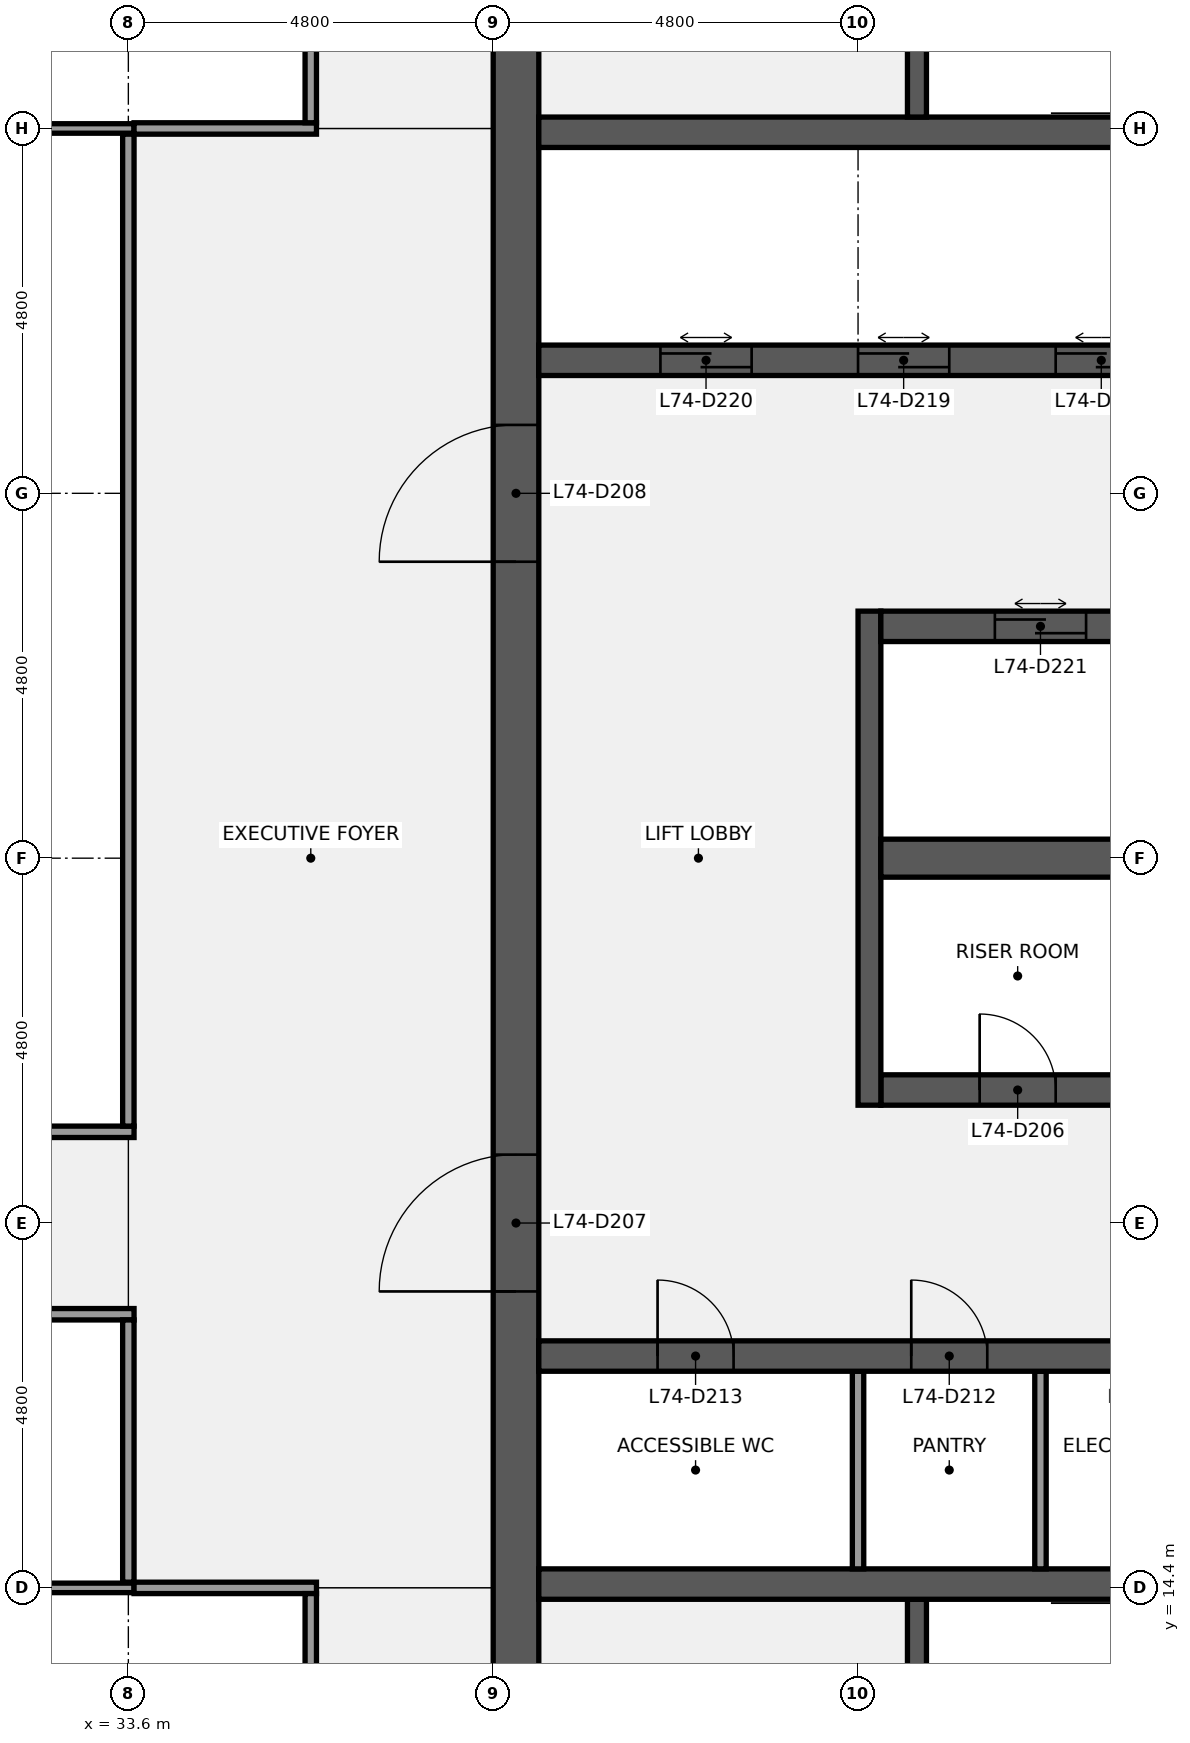
"""IFC4 building model, lengths in metres.
Left out: names, types, materials, properties, quantities, classifications, styles, units other than length and angle.
Written with IfcOpenShell. Run it as: python <this file> out.ifc"""

import sys

from ifc_helpers import new_model, si_unit, direction, frame, frame_2d, origin, place, context, subcontext, project, spatial, rectangle, extrude, element, fill, save


model = new_model("IFC4")
c1 = context("Model", 3, precision=1e-05, world=origin(), true_north=direction((0.0, 1.0)))
c2 = subcontext(c1, "Body", "Model", "MODEL_VIEW")
j1 = project(units=[si_unit("LENGTHUNIT", "METRE"), si_unit("PLANEANGLEUNIT", "RADIAN")], contexts=[c1])
p1 = place(None, origin())
s1 = spatial("IfcSite", under=j1, at=p1, CompositionType="ELEMENT")
p2 = place(p1, origin())
s2 = spatial("IfcBuilding", under=s1, at=p2, CompositionType="ELEMENT")
p3 = place(p2, frame((0.0, 0.0, 334.3)))
s3 = spatial("IfcBuildingStorey", under=s2, at=p3, CompositionType="ELEMENT", Elevation=334.3)
p4 = place(p3, frame((38.7, 9.6, 0.0), z_axis=(0.0, 0.0, 1.0), x_axis=(0.0, 1.0, 0.0)))
e1 = element("IfcWall", 1, at=p4, inside=s3, PredefinedType="SHEAR", context=c2, shape_type="SweptSolid", body=[
    extrude(rectangle(XDim=28.8, YDim=0.6, at=frame_2d((14.4, 0.0))), origin(), (0.0, 0.0, 1.0), 3.84),
])
p5 = place(p4, frame((8.7, 0.0, 0.0)))
e2 = element("IfcOpeningElement", 2, at=p5, cuts=e1, PredefinedType="OPENING", context=c2, shape_type="SweptSolid", body=[
    extrude(rectangle(XDim=1.8, YDim=2.1, at=frame_2d((0.9, 1.05))), frame((0.0, 0.31, 0.0), z_axis=(0.0, -1.0, 0.0), x_axis=(1.0, 0.0, 0.0)), (0.0, 0.0, 1.0), 0.62),
])
p6 = place(p4, frame((18.3, 0.0, 0.0)))
e3 = element("IfcOpeningElement", 3, at=p6, cuts=e1, PredefinedType="OPENING", context=c2, shape_type="SweptSolid", body=[
    extrude(rectangle(XDim=1.8, YDim=2.1, at=frame_2d((0.9, 1.05))), frame((0.0, 0.31, 0.0), z_axis=(0.0, -1.0, 0.0), x_axis=(1.0, 0.0, 0.0)), (0.0, 0.0, 1.0), 0.62),
])
p7 = place(p3, frame((43.975, 10.8, 0.0), z_axis=(0.0, 0.0, 1.0), x_axis=(0.0, 1.0, 0.0)))
e4 = element("IfcWall", 4, at=p7, inside=s3, PredefinedType="SHEAR", context=c2, shape_type="SweptSolid", body=[
    extrude(rectangle(XDim=3.45, YDim=0.25, at=frame_2d((1.725, 0.0))), origin(), (0.0, 0.0, 1.0), 3.84),
])
p8 = place(p7, frame((1.175, 0.0, 0.0)))
e5 = element("IfcOpeningElement", 5, at=p8, cuts=e4, PredefinedType="OPENING", context=c2, shape_type="SweptSolid", body=[
    extrude(rectangle(XDim=1.1, YDim=2.1, at=frame_2d((0.55, 1.05))), frame((0.0, 0.135, 0.0), z_axis=(0.0, -1.0, 0.0), x_axis=(1.0, 0.0, 0.0)), (0.0, 0.0, 1.0), 0.27),
])
p9 = place(p3, frame((39.0, 14.45, 0.0), z_axis=(0.0, 0.0, 1.0), x_axis=(1.0, 0.0, 0.0)))
e6 = element("IfcWall", 6, at=p9, inside=s3, PredefinedType="SHEAR", context=c2, shape_type="SweptSolid", body=[
    extrude(rectangle(XDim=18.0, YDim=0.4, at=frame_2d((9.0, 0.0))), origin(), (0.0, 0.0, 1.0), 3.84),
])
for number, where, z_axis, x_axis in (
    (7, (45.6, 14.65, 0.0), (0.0, 0.0, 1.0), (0.0, 1.0, 0.0)),
    (8, (43.2, 14.65, 0.0), (0.0, 0.0, 1.0), (0.0, 1.0, 0.0)),
):
    element("IfcWall", number, at=place(p3, frame(where, z_axis=z_axis, x_axis=x_axis)), inside=s3, PredefinedType="PARTITIONING", context=c2, shape_type="SweptSolid", body=[
        extrude(rectangle(XDim=2.6, YDim=0.15, at=frame_2d((1.3, 0.0))), origin(), (0.0, 0.0, 1.0), 3.84),
    ])
p10 = place(p3, frame((39.0, 17.45, 0.0), z_axis=(0.0, 0.0, 1.0), x_axis=(1.0, 0.0, 0.0)))
e9 = element("IfcWall", 9, at=p10, inside=s3, PredefinedType="SHEAR", context=c2, shape_type="SweptSolid", body=[
    extrude(rectangle(XDim=18.0, YDim=0.4, at=frame_2d((9.0, 0.0))), origin(), (0.0, 0.0, 1.0), 3.84),
])
p11 = place(p10, frame((15.137, 0.0, 0.0)))
e10 = element("IfcOpeningElement", 10, at=p11, cuts=e9, PredefinedType="OPENING", context=c2, shape_type="SweptSolid", body=[
    extrude(rectangle(XDim=1.0, YDim=2.1, at=frame_2d((0.5, 1.05))), frame((0.0, 0.21, 0.0), z_axis=(0.0, -1.0, 0.0), x_axis=(1.0, 0.0, 0.0)), (0.0, 0.0, 1.0), 0.42),
])
p12 = place(p10, frame((10.9, 0.0, 0.0)))
e11 = element("IfcOpeningElement", 11, at=p12, cuts=e9, PredefinedType="OPENING", context=c2, shape_type="SweptSolid", body=[
    extrude(rectangle(XDim=1.0, YDim=2.1, at=frame_2d((0.5, 1.05))), frame((0.0, 0.21, 0.0), z_axis=(0.0, -1.0, 0.0), x_axis=(1.0, 0.0, 0.0)), (0.0, 0.0, 1.0), 0.42),
])
p13 = place(p10, frame((7.6, 0.0, 0.0)))
e12 = element("IfcOpeningElement", 12, at=p13, cuts=e9, PredefinedType="OPENING", context=c2, shape_type="SweptSolid", body=[
    extrude(rectangle(XDim=1.0, YDim=2.1, at=frame_2d((0.5, 1.05))), frame((0.0, 0.21, 0.0), z_axis=(0.0, -1.0, 0.0), x_axis=(1.0, 0.0, 0.0)), (0.0, 0.0, 1.0), 0.42),
])
p14 = place(p10, frame((4.9, 0.0, 0.0)))
e13 = element("IfcOpeningElement", 13, at=p14, cuts=e9, PredefinedType="OPENING", context=c2, shape_type="SweptSolid", body=[
    extrude(rectangle(XDim=1.0, YDim=2.1, at=frame_2d((0.5, 1.05))), frame((0.0, 0.21, 0.0), z_axis=(0.0, -1.0, 0.0), x_axis=(1.0, 0.0, 0.0)), (0.0, 0.0, 1.0), 0.42),
])
p15 = place(p10, frame((1.562, 0.0, 0.0)))
e14 = element("IfcOpeningElement", 14, at=p15, cuts=e9, PredefinedType="OPENING", context=c2, shape_type="SweptSolid", body=[
    extrude(rectangle(XDim=1.0, YDim=2.1, at=frame_2d((0.5, 1.05))), frame((0.0, 0.21, 0.0), z_axis=(0.0, -1.0, 0.0), x_axis=(1.0, 0.0, 0.0)), (0.0, 0.0, 1.0), 0.42),
])
p16 = place(p3, frame((43.5, 20.95, 0.0), z_axis=(0.0, 0.0, 1.0), x_axis=(1.0, 0.0, 0.0)))
e15 = element("IfcWall", 15, at=p16, inside=s3, PredefinedType="SHEAR", context=c2, shape_type="SweptSolid", body=[
    extrude(rectangle(XDim=13.5, YDim=0.4, at=frame_2d((6.75, 0.0))), origin(), (0.0, 0.0, 1.0), 3.84),
])
p17 = place(p16, frame((6.15, 0.0, 0.0)))
e16 = element("IfcOpeningElement", 16, at=p17, cuts=e15, PredefinedType="OPENING", context=c2, shape_type="SweptSolid", body=[
    extrude(rectangle(XDim=1.1, YDim=2.1, at=frame_2d((0.55, 1.05))), frame((0.0, 0.21, 0.0), z_axis=(0.0, -1.0, 0.0), x_axis=(1.0, 0.0, 0.0)), (0.0, 0.0, 1.0), 0.42),
])
p18 = place(p16, frame((1.3, 0.0, 0.0)))
e17 = element("IfcOpeningElement", 17, at=p18, cuts=e15, PredefinedType="OPENING", context=c2, shape_type="SweptSolid", body=[
    extrude(rectangle(XDim=1.0, YDim=2.1, at=frame_2d((0.5, 1.05))), frame((0.0, 0.21, 0.0), z_axis=(0.0, -1.0, 0.0), x_axis=(1.0, 0.0, 0.0)), (0.0, 0.0, 1.0), 0.42),
])
p19 = place(p3, frame((43.35, 20.75, 0.0), z_axis=(0.0, 0.0, 1.0), x_axis=(0.0, 1.0, 0.0)))
e18 = element("IfcWall", 18, at=p19, inside=s3, PredefinedType="SHEAR", context=c2, shape_type="SweptSolid", body=[
    extrude(rectangle(XDim=6.5, YDim=0.3, at=frame_2d((3.25, 0.0))), origin(), (0.0, 0.0, 1.0), 3.84),
])
p20 = place(p3, frame((43.5, 24.0, 0.0), z_axis=(0.0, 0.0, 1.0), x_axis=(1.0, 0.0, 0.0)))
e19 = element("IfcWall", 19, at=p20, inside=s3, PredefinedType="SHEAR", context=c2, shape_type="SweptSolid", body=[
    extrude(rectangle(XDim=13.5, YDim=0.5, at=frame_2d((6.75, 0.0))), origin(), (0.0, 0.0, 1.0), 3.84),
])
p21 = place(p3, frame((43.5, 27.05, 0.0), z_axis=(0.0, 0.0, 1.0), x_axis=(1.0, 0.0, 0.0)))
e20 = element("IfcWall", 20, at=p21, inside=s3, PredefinedType="SHEAR", context=c2, shape_type="SweptSolid", body=[
    extrude(rectangle(XDim=13.5, YDim=0.4, at=frame_2d((6.75, 0.0))), origin(), (0.0, 0.0, 1.0), 3.84),
])
p22 = place(p21, frame((8.65, 0.0, 0.0)))
e21 = element("IfcOpeningElement", 21, at=p22, cuts=e20, PredefinedType="OPENING", context=c2, shape_type="SweptSolid", body=[
    extrude(rectangle(XDim=1.0, YDim=2.1, at=frame_2d((0.5, 1.05))), frame((0.0, 0.21, 0.0), z_axis=(0.0, -1.0, 0.0), x_axis=(1.0, 0.0, 0.0)), (0.0, 0.0, 1.0), 0.42),
])
p23 = place(p21, frame((1.5, 0.0, 0.0)))
e22 = element("IfcOpeningElement", 22, at=p23, cuts=e20, PredefinedType="OPENING", context=c2, shape_type="SweptSolid", body=[
    extrude(rectangle(XDim=1.2, YDim=2.1, at=frame_2d((0.6, 1.05))), frame((0.0, 0.21, 0.0), z_axis=(0.0, -1.0, 0.0), x_axis=(1.0, 0.0, 0.0)), (0.0, 0.0, 1.0), 0.42),
])
p24 = place(p3, frame((39.0, 30.55, 0.0), z_axis=(0.0, 0.0, 1.0), x_axis=(1.0, 0.0, 0.0)))
e23 = element("IfcWall", 23, at=p24, inside=s3, PredefinedType="SHEAR", context=c2, shape_type="SweptSolid", body=[
    extrude(rectangle(XDim=18.0, YDim=0.4, at=frame_2d((9.0, 0.0))), origin(), (0.0, 0.0, 1.0), 3.84),
])
p25 = place(p24, frame((15.2, 0.0, 0.0)))
e24 = element("IfcOpeningElement", 24, at=p25, cuts=e23, PredefinedType="OPENING", context=c2, shape_type="SweptSolid", body=[
    extrude(rectangle(XDim=1.2, YDim=2.1, at=frame_2d((0.6, 1.05))), frame((0.0, 0.21, 0.0), z_axis=(0.0, -1.0, 0.0), x_axis=(1.0, 0.0, 0.0)), (0.0, 0.0, 1.0), 0.42),
])
p26 = place(p24, frame((12.6, 0.0, 0.0)))
e25 = element("IfcOpeningElement", 25, at=p26, cuts=e23, PredefinedType="OPENING", context=c2, shape_type="SweptSolid", body=[
    extrude(rectangle(XDim=1.2, YDim=2.1, at=frame_2d((0.6, 1.05))), frame((0.0, 0.21, 0.0), z_axis=(0.0, -1.0, 0.0), x_axis=(1.0, 0.0, 0.0)), (0.0, 0.0, 1.0), 0.42),
])
p27 = place(p24, frame((10.0, 0.0, 0.0)))
e26 = element("IfcOpeningElement", 26, at=p27, cuts=e23, PredefinedType="OPENING", context=c2, shape_type="SweptSolid", body=[
    extrude(rectangle(XDim=1.2, YDim=2.1, at=frame_2d((0.6, 1.05))), frame((0.0, 0.21, 0.0), z_axis=(0.0, -1.0, 0.0), x_axis=(1.0, 0.0, 0.0)), (0.0, 0.0, 1.0), 0.42),
])
p28 = place(p24, frame((6.8, 0.0, 0.0)))
e27 = element("IfcOpeningElement", 27, at=p28, cuts=e23, PredefinedType="OPENING", context=c2, shape_type="SweptSolid", body=[
    extrude(rectangle(XDim=1.2, YDim=2.1, at=frame_2d((0.6, 1.05))), frame((0.0, 0.21, 0.0), z_axis=(0.0, -1.0, 0.0), x_axis=(1.0, 0.0, 0.0)), (0.0, 0.0, 1.0), 0.42),
])
p29 = place(p24, frame((4.2, 0.0, 0.0)))
e28 = element("IfcOpeningElement", 28, at=p29, cuts=e23, PredefinedType="OPENING", context=c2, shape_type="SweptSolid", body=[
    extrude(rectangle(XDim=1.2, YDim=2.1, at=frame_2d((0.6, 1.05))), frame((0.0, 0.21, 0.0), z_axis=(0.0, -1.0, 0.0), x_axis=(1.0, 0.0, 0.0)), (0.0, 0.0, 1.0), 0.42),
])
p30 = place(p24, frame((1.6, 0.0, 0.0)))
e29 = element("IfcOpeningElement", 29, at=p30, cuts=e23, PredefinedType="OPENING", context=c2, shape_type="SweptSolid", body=[
    extrude(rectangle(XDim=1.2, YDim=2.1, at=frame_2d((0.6, 1.05))), frame((0.0, 0.21, 0.0), z_axis=(0.0, -1.0, 0.0), x_axis=(1.0, 0.0, 0.0)), (0.0, 0.0, 1.0), 0.42),
])
p31 = place(p3, frame((39.0, 33.55, 0.0), z_axis=(0.0, 0.0, 1.0), x_axis=(1.0, 0.0, 0.0)))
e30 = element("IfcWall", 30, at=p31, inside=s3, PredefinedType="SHEAR", context=c2, shape_type="SweptSolid", body=[
    extrude(rectangle(XDim=18.0, YDim=0.4, at=frame_2d((9.0, 0.0))), origin(), (0.0, 0.0, 1.0), 3.84),
])
p32 = place(p3, frame((43.975, 33.75, 0.0), z_axis=(0.0, 0.0, 1.0), x_axis=(0.0, 1.0, 0.0)))
e31 = element("IfcWall", 31, at=p32, inside=s3, PredefinedType="SHEAR", context=c2, shape_type="SweptSolid", body=[
    extrude(rectangle(XDim=3.45, YDim=0.25, at=frame_2d((1.725, 0.0))), origin(), (0.0, 0.0, 1.0), 3.84),
])
p33 = place(p32, frame((1.175, 0.0, 0.0)))
e32 = element("IfcOpeningElement", 32, at=p33, cuts=e31, PredefinedType="OPENING", context=c2, shape_type="SweptSolid", body=[
    extrude(rectangle(XDim=1.1, YDim=2.1, at=frame_2d((0.55, 1.05))), frame((0.0, 0.135, 0.0), z_axis=(0.0, -1.0, 0.0), x_axis=(1.0, 0.0, 0.0)), (0.0, 0.0, 1.0), 0.27),
])
p34 = place(p3, frame((24.075, 14.4, 0.0), z_axis=(0.0, 0.0, 1.0), x_axis=(1.0, 0.0, 0.0)))
e33 = element("IfcWall", 33, at=p34, inside=s3, PredefinedType="PARTITIONING", context=c2, shape_type="SweptSolid", body=[
    extrude(rectangle(XDim=9.6, YDim=0.125, at=frame_2d((4.8, 0.0))), origin(), (0.0, 0.0, 1.0), 2.849),
])
p35 = place(p3, frame((33.675, 14.4, 0.0), z_axis=(0.0, 0.0, 1.0), x_axis=(1.0, 0.0, 0.0)))
e34 = element("IfcWall", 34, at=p35, inside=s3, PredefinedType="PARTITIONING", context=c2, shape_type="SweptSolid", body=[
    extrude(rectangle(XDim=2.4, YDim=0.15, at=frame_2d((1.2, 0.0))), origin(), (0.0, 0.0, 1.0), 2.849),
])
p36 = place(p3, frame((23.925, 18.0, 0.0), z_axis=(0.0, 0.0, 1.0), x_axis=(1.0, 0.0, 0.0)))
e35 = element("IfcWall", 35, at=p36, inside=s3, PredefinedType="PARTITIONING", context=c2, shape_type="SweptSolid", body=[
    extrude(rectangle(XDim=9.75, YDim=0.15, at=frame_2d((4.875, 0.0))), origin(), (0.0, 0.0, 1.0), 2.849),
])
p37 = place(p36, frame((4.375, 0.0, 0.0)))
e36 = element("IfcOpeningElement", 36, at=p37, cuts=e35, PredefinedType="OPENING", context=c2, shape_type="SweptSolid", body=[
    extrude(rectangle(XDim=1.0, YDim=2.1, at=frame_2d((0.5, 1.05))), frame((0.0, 0.085, 0.0), z_axis=(0.0, -1.0, 0.0), x_axis=(1.0, 0.0, 0.0)), (0.0, 0.0, 1.0), 0.17),
])
p38 = place(p3, frame((23.925, 20.4, 0.0), z_axis=(0.0, 0.0, 1.0), x_axis=(1.0, 0.0, 0.0)))
e37 = element("IfcWall", 37, at=p38, inside=s3, PredefinedType="PARTITIONING", context=c2, shape_type="SweptSolid", body=[
    extrude(rectangle(XDim=9.75, YDim=0.15, at=frame_2d((4.875, 0.0))), origin(), (0.0, 0.0, 1.0), 2.849),
])
p39 = place(p3, frame((24.075, 33.6, 0.0), z_axis=(0.0, 0.0, 1.0), x_axis=(1.0, 0.0, 0.0)))
e38 = element("IfcWall", 38, at=p39, inside=s3, PredefinedType="PARTITIONING", context=c2, shape_type="SweptSolid", body=[
    extrude(rectangle(XDim=9.6, YDim=0.125, at=frame_2d((4.8, 0.0))), origin(), (0.0, 0.0, 1.0), 2.849),
])
p40 = place(p3, frame((33.675, 33.6, 0.0), z_axis=(0.0, 0.0, 1.0), x_axis=(1.0, 0.0, 0.0)))
e39 = element("IfcWall", 39, at=p40, inside=s3, PredefinedType="PARTITIONING", context=c2, shape_type="SweptSolid", body=[
    extrude(rectangle(XDim=2.4, YDim=0.15, at=frame_2d((1.2, 0.0))), origin(), (0.0, 0.0, 1.0), 2.849),
])
p41 = place(p3, frame((33.6, 14.475, 0.0), z_axis=(0.0, 0.0, 1.0), x_axis=(0.0, 1.0, 0.0)))
e40 = element("IfcWall", 40, at=p41, inside=s3, PredefinedType="PARTITIONING", context=c2, shape_type="SweptSolid", body=[
    extrude(rectangle(XDim=3.45, YDim=0.15, at=frame_2d((1.725, 0.0))), origin(), (0.0, 0.0, 1.0), 2.849),
])
p42 = place(p3, frame((33.6, 20.475, 0.0), z_axis=(0.0, 0.0, 1.0), x_axis=(0.0, 1.0, 0.0)))
e41 = element("IfcWall", 41, at=p42, inside=s3, PredefinedType="PARTITIONING", context=c2, shape_type="SweptSolid", body=[
    extrude(rectangle(XDim=13.05, YDim=0.15, at=frame_2d((6.525, 0.0))), origin(), (0.0, 0.0, 1.0), 2.849),
])
for number, where, z_axis, x_axis in (
    (42, (36.0, 9.675, 0.0), (0.0, 0.0, 1.0), (0.0, 1.0, 0.0)),
    (43, (36.0, 33.675, 0.0), (0.0, 0.0, 1.0), (0.0, 1.0, 0.0)),
):
    element("IfcWall", number, at=place(p3, frame(where, z_axis=z_axis, x_axis=x_axis)), inside=s3, PredefinedType="PARTITIONING", context=c2, shape_type="SweptSolid", body=[
        extrude(rectangle(XDim=4.65, YDim=0.15, at=frame_2d((2.325, 0.0))), origin(), (0.0, 0.0, 1.0), 2.849),
    ])
p43 = place(p18, origin())
e44 = element("IfcDoor", 44, at=p43, inside=s3, OperationType="SINGLE_SWING_LEFT", PredefinedType="DOOR", context=c2, shape_type="SweptSolid", body=[
    extrude(rectangle(XDim=1.0, YDim=2.1, at=frame_2d((0.5, 1.05))), frame((0.0, 0.025, 0.0), z_axis=(0.0, -1.0, 0.0), x_axis=(1.0, 0.0, 0.0)), (0.0, 0.0, 1.0), 0.05),
])
fill(e17, e44)
p44 = place(p5, origin())
e45 = element("IfcDoor", 45, at=p44, inside=s3, OperationType="DOUBLE_DOOR_SINGLE_SWING", PredefinedType="DOOR", context=c2, shape_type="SweptSolid", body=[
    extrude(rectangle(XDim=1.8, YDim=2.1, at=frame_2d((0.9, 1.05))), frame((0.0, 0.025, 0.0), z_axis=(0.0, -1.0, 0.0), x_axis=(1.0, 0.0, 0.0)), (0.0, 0.0, 1.0), 0.05),
])
fill(e2, e45)
p45 = place(p6, origin())
e46 = element("IfcDoor", 46, at=p45, inside=s3, OperationType="DOUBLE_DOOR_SINGLE_SWING", PredefinedType="DOOR", context=c2, shape_type="SweptSolid", body=[
    extrude(rectangle(XDim=1.8, YDim=2.1, at=frame_2d((0.9, 1.05))), frame((0.0, 0.025, 0.0), z_axis=(0.0, -1.0, 0.0), x_axis=(1.0, 0.0, 0.0)), (0.0, 0.0, 1.0), 0.05),
])
fill(e3, e46)
p46 = place(p14, origin())
e47 = element("IfcDoor", 47, at=p46, inside=s3, OperationType="SINGLE_SWING_LEFT", PredefinedType="DOOR", context=c2, shape_type="SweptSolid", body=[
    extrude(rectangle(XDim=1.0, YDim=2.1, at=frame_2d((0.5, 1.05))), frame((0.0, 0.025, 0.0), z_axis=(0.0, -1.0, 0.0), x_axis=(1.0, 0.0, 0.0)), (0.0, 0.0, 1.0), 0.05),
])
fill(e13, e47)
p47 = place(p15, origin())
e48 = element("IfcDoor", 48, at=p47, inside=s3, OperationType="SINGLE_SWING_LEFT", PredefinedType="DOOR", context=c2, shape_type="SweptSolid", body=[
    extrude(rectangle(XDim=1.0, YDim=2.1, at=frame_2d((0.5, 1.05))), frame((0.0, 0.025, 0.0), z_axis=(0.0, -1.0, 0.0), x_axis=(1.0, 0.0, 0.0)), (0.0, 0.0, 1.0), 0.05),
])
fill(e14, e48)
p48 = place(p28, origin())
e49 = element("IfcDoor", 49, at=p48, inside=s3, OperationType="DOUBLE_DOOR_SLIDING", PredefinedType="DOOR", context=c2, shape_type="SweptSolid", body=[
    extrude(rectangle(XDim=1.2, YDim=2.1, at=frame_2d((0.6, 1.05))), frame((0.0, 0.025, 0.0), z_axis=(0.0, -1.0, 0.0), x_axis=(1.0, 0.0, 0.0)), (0.0, 0.0, 1.0), 0.05),
])
fill(e27, e49)
p49 = place(p29, origin())
e50 = element("IfcDoor", 50, at=p49, inside=s3, OperationType="DOUBLE_DOOR_SLIDING", PredefinedType="DOOR", context=c2, shape_type="SweptSolid", body=[
    extrude(rectangle(XDim=1.2, YDim=2.1, at=frame_2d((0.6, 1.05))), frame((0.0, 0.025, 0.0), z_axis=(0.0, -1.0, 0.0), x_axis=(1.0, 0.0, 0.0)), (0.0, 0.0, 1.0), 0.05),
])
fill(e28, e50)
p50 = place(p30, origin())
e51 = element("IfcDoor", 51, at=p50, inside=s3, OperationType="DOUBLE_DOOR_SLIDING", PredefinedType="DOOR", context=c2, shape_type="SweptSolid", body=[
    extrude(rectangle(XDim=1.2, YDim=2.1, at=frame_2d((0.6, 1.05))), frame((0.0, 0.025, 0.0), z_axis=(0.0, -1.0, 0.0), x_axis=(1.0, 0.0, 0.0)), (0.0, 0.0, 1.0), 0.05),
])
fill(e29, e51)
p51 = place(p23, origin())
e52 = element("IfcDoor", 52, at=p51, inside=s3, OperationType="DOUBLE_DOOR_SLIDING", PredefinedType="DOOR", context=c2, shape_type="SweptSolid", body=[
    extrude(rectangle(XDim=1.2, YDim=2.1, at=frame_2d((0.6, 1.05))), frame((0.0, 0.025, 0.0), z_axis=(0.0, -1.0, 0.0), x_axis=(1.0, 0.0, 0.0)), (0.0, 0.0, 1.0), 0.05),
])
fill(e22, e52)
save(model, sys.argv[1])
